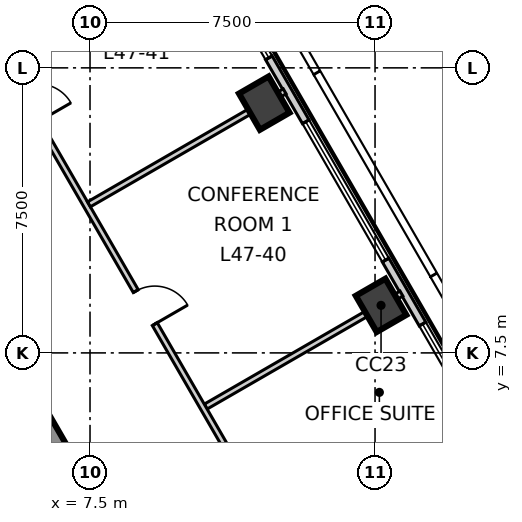
"""IFC4 building model, lengths in metres.
Left out: names, types, materials, properties, quantities, classifications, styles, units other than length and angle.
Written with IfcOpenShell. Run it as: python <this file> out.ifc"""

import sys

from ifc_helpers import new_model, si_unit, direction, frame, frame_2d, origin, origin_2d, place, context, subcontext, project, spatial, polyline, rectangle, outline, extrude, element, fill, save


model = new_model("IFC4")
c1 = context("Model", 3, precision=1e-05, world=origin(), true_north=direction((0.0, 1.0)))
c2 = subcontext(c1, "Body", "Model", "MODEL_VIEW")
j1 = project(units=[si_unit("LENGTHUNIT", "METRE"), si_unit("PLANEANGLEUNIT", "RADIAN")], contexts=[c1])
p1 = place(None, origin())
s1 = spatial("IfcSite", under=j1, at=p1, CompositionType="ELEMENT")
p2 = place(p1, origin())
s2 = spatial("IfcBuilding", under=s1, at=p2, CompositionType="ELEMENT")
p3 = place(p2, frame((0.0, 0.0, 203.3)))
s3 = spatial("IfcBuildingStorey", under=s2, at=p3, CompositionType="ELEMENT", Elevation=203.3)
p4 = place(p3, frame((12.413, -5.2, -0.3), z_axis=(0.0, 0.0, 1.0), x_axis=(-0.500011533395, 0.866018744874, 0.0)))
e1 = element("IfcWall", 1, at=p4, inside=s3, PredefinedType="SHEAR", context=c2, shape_type="SweptSolid", body=[
    extrude(outline(polyline([(-0.202, -0.35), (1.782, -0.35), (3.766, -0.35), (5.75, -0.35), (7.734, -0.35), (9.718, -0.35), (11.702, -0.35), (13.686, -0.35), (15.67, -0.35), (17.654, -0.35), (19.638, -0.35), (21.622, -0.35), (21.218, 0.35), (19.307, 0.35), (17.397, 0.35), (15.486, 0.35), (13.576, 0.35), (11.665, 0.35), (9.755, 0.35), (7.844, 0.35), (5.934, 0.35), (4.023, 0.35), (2.113, 0.35), (0.202, 0.35), (-0.202, -0.35)])), origin(), (0.0, 0.0, 1.0), 4.0),
])
p5 = place(p4, frame((4.055, 0.0, 0.3)))
e2 = element("IfcOpeningElement", 2, at=p5, cuts=e1, PredefinedType="OPENING", context=c2, shape_type="SweptSolid", body=[
    extrude(rectangle(XDim=0.9, YDim=2.1, at=frame_2d((0.45, 1.05))), frame((0.0, 0.36, 0.0), z_axis=(0.0, -1.0, 0.0), x_axis=(1.0, 0.0, 0.0)), (0.0, 0.0, 1.0), 0.72),
])
p6 = place(p4, frame((16.415, 0.0, 0.3)))
e3 = element("IfcOpeningElement", 3, at=p6, cuts=e1, PredefinedType="OPENING", context=c2, shape_type="SweptSolid", body=[
    extrude(rectangle(XDim=1.0, YDim=2.1, at=frame_2d((0.5, 1.05))), frame((0.0, 0.36, 0.0), z_axis=(0.0, -1.0, 0.0), x_axis=(1.0, 0.0, 0.0)), (0.0, 0.0, 1.0), 0.72),
])
for number, where, z_axis, x_axis in (
    (4, (15.158, 8.751, -0.3), (0.0, 0.0, 1.0), (-0.5, 0.866, 0.0)),
    (5, (12.085, 14.072, -0.3), (0.0, 0.0, 1.0), (-0.5, 0.866, 0.0)),
):
    element("IfcColumn", number, at=place(p3, frame(where, z_axis=z_axis, x_axis=x_axis)), inside=s3, PredefinedType="COLUMN", context=c2, shape_type="SweptSolid", body=[
        extrude(rectangle(XDim=1.1, YDim=0.9, at=origin_2d()), origin(), (0.0, 0.0, 1.0), 4.0),
    ])
p7 = place(p3, frame((28.704, -13.311, 0.0), z_axis=(0.0, 0.0, 1.0), x_axis=(-0.500010281129, 0.866019467891, 0.0)))
e6 = element("IfcWall", 6, at=p7, inside=s3, PredefinedType="ELEMENTEDWALL", context=c2, shape_type="SweptSolid", body=[
    extrude(rectangle(XDim=51.739, YDim=0.2, at=frame_2d((25.87, 0.0))), origin(), (0.0, 0.0, 1.0), 3.7),
])
p8 = place(p7, frame((2.275, 0.0, 0.9)))
e7 = element("IfcOpeningElement", 7, at=p8, cuts=e6, PredefinedType="OPENING", context=c2, shape_type="SweptSolid", body=[
    extrude(rectangle(XDim=4.2, YDim=2.5, at=frame_2d((2.1, 1.25))), frame((0.0, 0.11, 0.0), z_axis=(0.0, -1.0, 0.0), x_axis=(1.0, 0.0, 0.0)), (0.0, 0.0, 1.0), 0.22),
])
p9 = place(p7, frame((8.419, 0.0, 0.9)))
e8 = element("IfcOpeningElement", 8, at=p9, cuts=e6, PredefinedType="OPENING", context=c2, shape_type="SweptSolid", body=[
    extrude(rectangle(XDim=4.2, YDim=2.5, at=frame_2d((2.1, 1.25))), frame((0.0, 0.11, 0.0), z_axis=(0.0, -1.0, 0.0), x_axis=(1.0, 0.0, 0.0)), (0.0, 0.0, 1.0), 0.22),
])
p10 = place(p7, frame((14.563, 0.0, 0.9)))
e9 = element("IfcOpeningElement", 9, at=p10, cuts=e6, PredefinedType="OPENING", context=c2, shape_type="SweptSolid", body=[
    extrude(rectangle(XDim=4.2, YDim=2.5, at=frame_2d((2.1, 1.25))), frame((0.0, 0.11, 0.0), z_axis=(0.0, -1.0, 0.0), x_axis=(1.0, 0.0, 0.0)), (0.0, 0.0, 1.0), 0.22),
])
p11 = place(p7, frame((20.707, 0.0, 0.9)))
e10 = element("IfcOpeningElement", 10, at=p11, cuts=e6, PredefinedType="OPENING", context=c2, shape_type="SweptSolid", body=[
    extrude(rectangle(XDim=4.2, YDim=2.5, at=frame_2d((2.1, 1.25))), frame((0.0, 0.11, 0.0), z_axis=(0.0, -1.0, 0.0), x_axis=(1.0, 0.0, 0.0)), (0.0, 0.0, 1.0), 0.22),
])
p12 = place(p7, frame((26.852, 0.0, 0.9)))
e11 = element("IfcOpeningElement", 11, at=p12, cuts=e6, PredefinedType="OPENING", context=c2, shape_type="SweptSolid", body=[
    extrude(rectangle(XDim=4.2, YDim=2.5, at=frame_2d((2.1, 1.25))), frame((0.0, 0.11, 0.0), z_axis=(0.0, -1.0, 0.0), x_axis=(1.0, 0.0, 0.0)), (0.0, 0.0, 1.0), 0.22),
])
p13 = place(p7, frame((32.996, 0.0, 0.9)))
e12 = element("IfcOpeningElement", 12, at=p13, cuts=e6, PredefinedType="OPENING", context=c2, shape_type="SweptSolid", body=[
    extrude(rectangle(XDim=4.2, YDim=2.5, at=frame_2d((2.1, 1.25))), frame((0.0, 0.11, 0.0), z_axis=(0.0, -1.0, 0.0), x_axis=(1.0, 0.0, 0.0)), (0.0, 0.0, 1.0), 0.22),
])
p14 = place(p7, frame((39.14, 0.0, 0.9)))
e13 = element("IfcOpeningElement", 13, at=p14, cuts=e6, PredefinedType="OPENING", context=c2, shape_type="SweptSolid", body=[
    extrude(rectangle(XDim=4.2, YDim=2.5, at=frame_2d((2.1, 1.25))), frame((0.0, 0.11, 0.0), z_axis=(0.0, -1.0, 0.0), x_axis=(1.0, 0.0, 0.0)), (0.0, 0.0, 1.0), 0.22),
])
p15 = place(p7, frame((45.284, 0.0, 0.9)))
e14 = element("IfcOpeningElement", 14, at=p15, cuts=e6, PredefinedType="OPENING", context=c2, shape_type="SweptSolid", body=[
    extrude(rectangle(XDim=4.2, YDim=2.5, at=frame_2d((2.1, 1.25))), frame((0.0, 0.11, 0.0), z_axis=(0.0, -1.0, 0.0), x_axis=(1.0, 0.0, 0.0)), (0.0, 0.0, 1.0), 0.22),
])
p16 = place(p3, frame((10.544, 6.087, 0.0), z_axis=(0.0, 0.0, 1.0), x_axis=(0.866016753976, 0.500014981608, 0.0)))
e15 = element("IfcWall", 15, at=p16, inside=s3, PredefinedType="PARTITIONING", context=c2, shape_type="SweptSolid", body=[
    extrude(rectangle(XDim=5.948, YDim=0.15, at=frame_2d((2.974, 0.0))), origin(), (0.0, 0.0, 1.0), 3.2),
])
p17 = place(p3, frame((0.075, 24.07, 0.0), z_axis=(0.0, 0.0, 1.0), x_axis=(0.500006834213, -0.866021458014, 0.0)))
e16 = element("IfcWall", 16, at=p17, inside=s3, PredefinedType="PARTITIONING", context=c2, shape_type="SweptSolid", body=[
    extrude(rectangle(XDim=41.616, YDim=0.15, at=frame_2d((20.808, 0.0))), origin(), (0.0, 0.0, 1.0), 3.7),
])
p18 = place(p17, frame((36.915, 0.0, 0.0)))
e17 = element("IfcOpeningElement", 17, at=p18, cuts=e16, PredefinedType="OPENING", context=c2, shape_type="SweptSolid", body=[
    extrude(rectangle(XDim=1.1, YDim=2.1, at=frame_2d((0.55, 1.05))), frame((0.0, 0.085, 0.0), z_axis=(0.0, -1.0, 0.0), x_axis=(1.0, 0.0, 0.0)), (0.0, 0.0, 1.0), 0.17),
])
p19 = place(p17, frame((22.046, 0.0, 0.0)))
e18 = element("IfcOpeningElement", 18, at=p19, cuts=e16, PredefinedType="OPENING", context=c2, shape_type="SweptSolid", body=[
    extrude(rectangle(XDim=1.1, YDim=2.1, at=frame_2d((0.55, 1.05))), frame((0.0, 0.085, 0.0), z_axis=(0.0, -1.0, 0.0), x_axis=(1.0, 0.0, 0.0)), (0.0, 0.0, 1.0), 0.17),
])
p20 = place(p17, frame((31.046, 0.0, 0.0)))
e19 = element("IfcOpeningElement", 19, at=p20, cuts=e16, PredefinedType="OPENING", context=c2, shape_type="SweptSolid", body=[
    extrude(rectangle(XDim=0.9, YDim=2.1, at=frame_2d((0.45, 1.05))), frame((0.0, 0.085, 0.0), z_axis=(0.0, -1.0, 0.0), x_axis=(1.0, 0.0, 0.0)), (0.0, 0.0, 1.0), 0.17),
])
p21 = place(p17, frame((27.846, 0.0, 0.0)))
e20 = element("IfcOpeningElement", 20, at=p21, cuts=e16, PredefinedType="OPENING", context=c2, shape_type="SweptSolid", body=[
    extrude(rectangle(XDim=0.9, YDim=2.1, at=frame_2d((0.45, 1.05))), frame((0.0, 0.085, 0.0), z_axis=(0.0, -1.0, 0.0), x_axis=(1.0, 0.0, 0.0)), (0.0, 0.0, 1.0), 0.17),
])
p22 = place(p17, frame((24.946, 0.0, 0.0)))
e21 = element("IfcOpeningElement", 21, at=p22, cuts=e16, PredefinedType="OPENING", context=c2, shape_type="SweptSolid", body=[
    extrude(rectangle(XDim=1.0, YDim=2.1, at=frame_2d((0.5, 1.05))), frame((0.0, 0.085, 0.0), z_axis=(0.0, -1.0, 0.0), x_axis=(1.0, 0.0, 0.0)), (0.0, 0.0, 1.0), 0.17),
])
p23 = place(p17, frame((17.258, 0.0, 0.0)))
e22 = element("IfcOpeningElement", 22, at=p23, cuts=e16, PredefinedType="OPENING", context=c2, shape_type="SweptSolid", body=[
    extrude(rectangle(XDim=1.0, YDim=2.1, at=frame_2d((0.5, 1.05))), frame((0.0, 0.085, 0.0), z_axis=(0.0, -1.0, 0.0), x_axis=(1.0, 0.0, 0.0)), (0.0, 0.0, 1.0), 0.17),
])
p24 = place(p17, frame((11.114, 0.0, 0.0)))
e23 = element("IfcOpeningElement", 23, at=p24, cuts=e16, PredefinedType="OPENING", context=c2, shape_type="SweptSolid", body=[
    extrude(rectangle(XDim=1.0, YDim=2.1, at=frame_2d((0.5, 1.05))), frame((0.0, 0.085, 0.0), z_axis=(0.0, -1.0, 0.0), x_axis=(1.0, 0.0, 0.0)), (0.0, 0.0, 1.0), 0.17),
])
p25 = place(p17, frame((3.669, 0.0, 0.0)))
e24 = element("IfcOpeningElement", 24, at=p25, cuts=e16, PredefinedType="OPENING", context=c2, shape_type="SweptSolid", body=[
    extrude(rectangle(XDim=1.0, YDim=2.1, at=frame_2d((0.5, 1.05))), frame((0.0, 0.085, 0.0), z_axis=(0.0, -1.0, 0.0), x_axis=(1.0, 0.0, 0.0)), (0.0, 0.0, 1.0), 0.17),
])
p26 = place(p3, frame((7.472, 11.409, 0.0), z_axis=(0.0, 0.0, 1.0), x_axis=(0.866046805426, 0.499962929437, 0.0)))
e25 = element("IfcWall", 25, at=p26, inside=s3, PredefinedType="PARTITIONING", context=c2, shape_type="SweptSolid", body=[
    extrude(rectangle(XDim=5.947, YDim=0.15, at=frame_2d((2.973, 0.0))), origin(), (0.0, 0.0, 1.0), 3.7),
])
p27 = place(p11, origin())
e26 = element("IfcWindow", 26, at=p27, inside=s3, PartitioningType="SINGLE_PANEL", PredefinedType="WINDOW", context=c2, shape_type="SweptSolid", body=[
    extrude(rectangle(XDim=4.2, YDim=2.5, at=frame_2d((2.1, 1.25))), frame((0.0, 0.03, 0.0), z_axis=(0.0, -1.0, 0.0), x_axis=(1.0, 0.0, 0.0)), (0.0, 0.0, 1.0), 0.06),
])
fill(e10, e26)
p28 = place(p12, origin())
e27 = element("IfcWindow", 27, at=p28, inside=s3, PartitioningType="SINGLE_PANEL", PredefinedType="WINDOW", context=c2, shape_type="SweptSolid", body=[
    extrude(rectangle(XDim=4.2, YDim=2.5, at=frame_2d((2.1, 1.25))), frame((0.0, 0.03, 0.0), z_axis=(0.0, -1.0, 0.0), x_axis=(1.0, 0.0, 0.0)), (0.0, 0.0, 1.0), 0.06),
])
fill(e11, e27)
p29 = place(p13, origin())
e28 = element("IfcWindow", 28, at=p29, inside=s3, PartitioningType="SINGLE_PANEL", PredefinedType="WINDOW", context=c2, shape_type="SweptSolid", body=[
    extrude(rectangle(XDim=4.2, YDim=2.5, at=frame_2d((2.1, 1.25))), frame((0.0, 0.03, 0.0), z_axis=(0.0, -1.0, 0.0), x_axis=(1.0, 0.0, 0.0)), (0.0, 0.0, 1.0), 0.06),
])
fill(e12, e28)
p30 = place(p23, origin())
e29 = element("IfcDoor", 29, at=p30, inside=s3, OperationType="SINGLE_SWING_LEFT", PredefinedType="DOOR", context=c2, shape_type="SweptSolid", body=[
    extrude(rectangle(XDim=1.0, YDim=2.1, at=frame_2d((0.5, 1.05))), frame((0.0, 0.025, 0.0), z_axis=(0.0, -1.0, 0.0), x_axis=(1.0, 0.0, 0.0)), (0.0, 0.0, 1.0), 0.05),
])
fill(e22, e29)
save(model, sys.argv[1])
